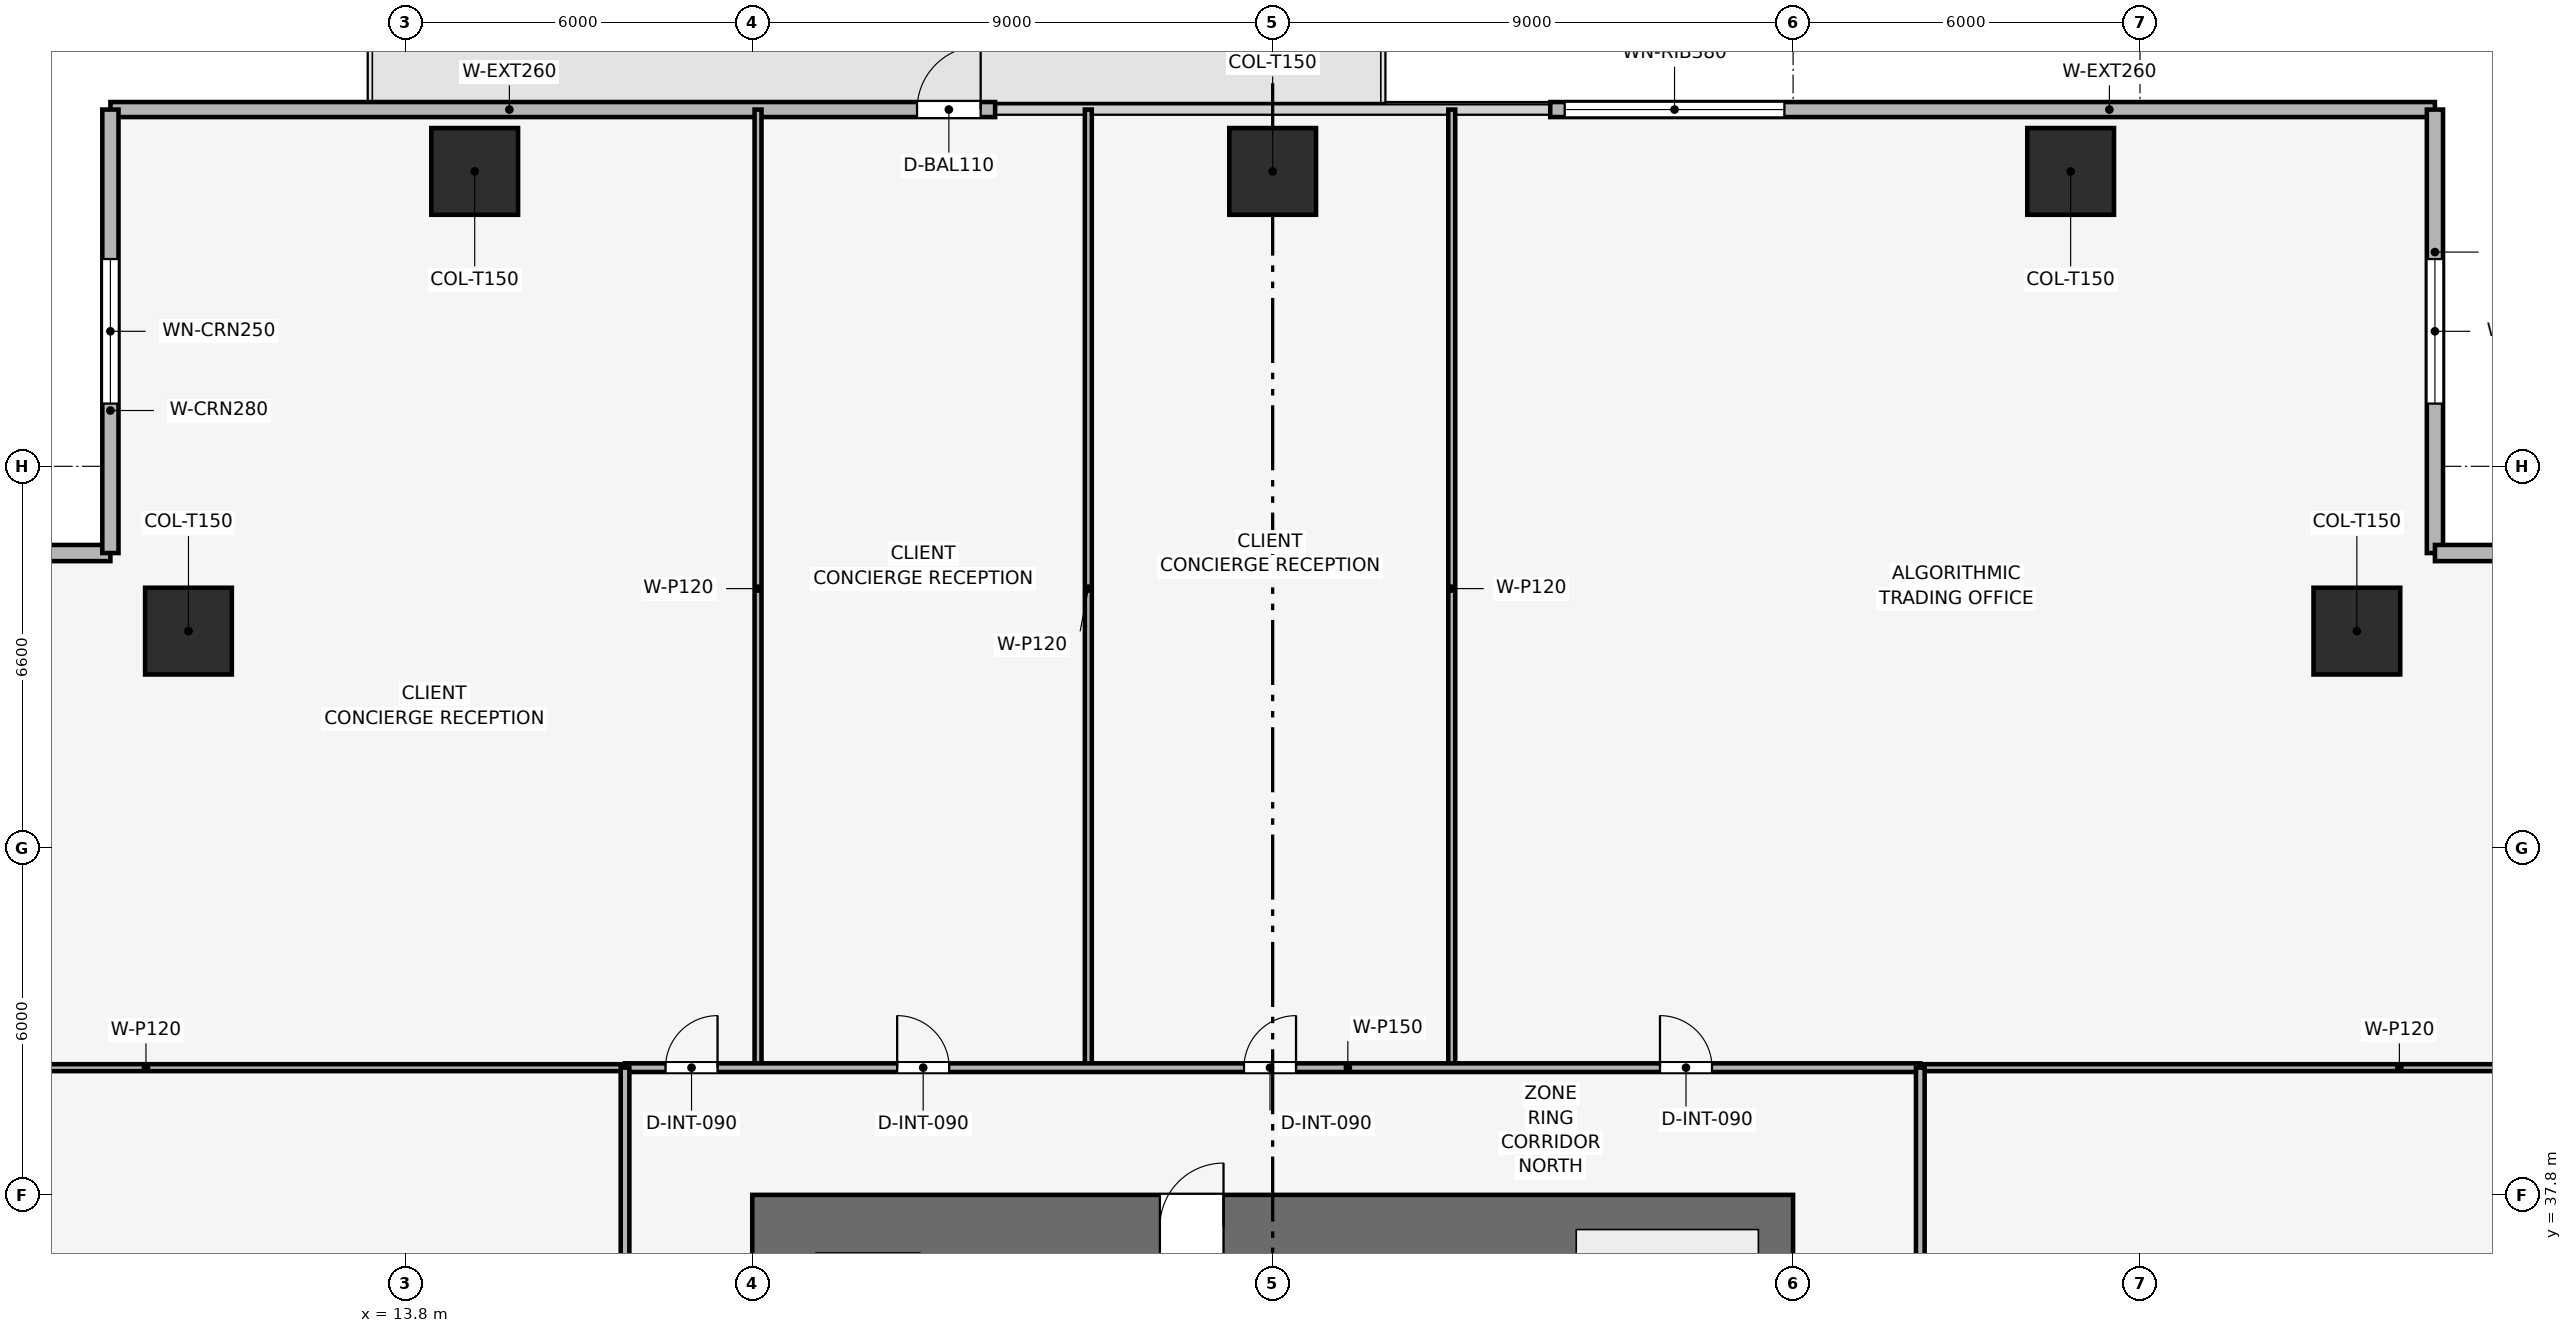
"""IFC4 building model, lengths in metres.
Left out: names, types, materials, properties, quantities, classifications, styles, units other than length and angle.
Written with IfcOpenShell. Run it as: python <this file> out.ifc"""

import sys

from ifc_helpers import new_model, si_unit, direction, frame, frame_2d, origin, origin_2d, place, context, subcontext, project, spatial, rectangle, extrude, element, fill, save


model = new_model("IFC4")
c1 = context("Model", 3, precision=1e-05, world=origin(), true_north=direction((0.0, 1.0)))
c2 = subcontext(c1, "Body", "Model", "MODEL_VIEW")
j1 = project(units=[si_unit("LENGTHUNIT", "METRE"), si_unit("PLANEANGLEUNIT", "RADIAN")], contexts=[c1])
p1 = place(None, origin())
s1 = spatial("IfcSite", under=j1, at=p1, CompositionType="ELEMENT")
p2 = place(p1, origin())
s2 = spatial("IfcBuilding", under=s1, at=p2, CompositionType="ELEMENT")
p3 = place(p2, frame((0.0, 0.0, 72.9)))
s3 = spatial("IfcBuildingStorey", under=s2, at=p3, CompositionType="ELEMENT", Elevation=72.9)
p4 = place(p3, frame((19.8, 37.25, 0.0), z_axis=(0.0, 0.0, 1.0), x_axis=(1.0, 0.0, 0.0)))
e1 = element("IfcWall", 1, at=p4, inside=s3, PredefinedType="SHEAR", context=c2, shape_type="SweptSolid", body=[
    extrude(rectangle(XDim=18.0, YDim=1.1, at=frame_2d((9.0, 0.0))), origin(), (0.0, 0.0, 1.0), 3.9),
])
p5 = place(p4, frame((7.05, 0.0, 0.0)))
e2 = element("IfcOpeningElement", 2, at=p5, cuts=e1, PredefinedType="OPENING", context=c2, shape_type="SweptSolid", body=[
    extrude(rectangle(XDim=1.1, YDim=2.15, at=frame_2d((0.55, 1.075))), frame((0.0, 0.56, 0.0), z_axis=(0.0, -1.0, 0.0), x_axis=(1.0, 0.0, 0.0)), (0.0, 0.0, 1.0), 1.12),
])
for number, where, z_axis, x_axis in (
    (3, (42.6, 55.5, 0.003), (0.0, 0.0, 1.0), (1.0, 0.0, 0.0)),
    (4, (28.8, 55.5, 0.003), (0.0, 0.0, 1.0), (1.0, 0.0, 0.0)),
    (5, (15.0, 55.5, 0.003), (0.0, 0.0, 1.0), (1.0, 0.0, 0.0)),
    (6, (47.55, 47.55, 0.003), (0.0, 0.0, 1.0), (1.0, 0.0, 0.0)),
    (7, (10.05, 47.55, 0.003), (0.0, 0.0, 1.0), (1.0, 0.0, 0.0)),
):
    element("IfcColumn", number, at=place(p3, frame(where, z_axis=z_axis, x_axis=x_axis)), inside=s3, PredefinedType="COLUMN", context=c2, shape_type="SweptSolid", body=[
        extrude(rectangle(XDim=1.5, YDim=1.5, at=origin_2d()), origin(), (0.0, 0.0, 1.0), 3.644),
    ])
p6 = place(p3, frame((8.7, 56.57, 0.0), z_axis=(0.0, 0.0, 1.0), x_axis=(1.0, 0.0, 0.0)))
e8 = element("IfcWall", 8, at=p6, inside=s3, PredefinedType="SOLIDWALL", context=c2, shape_type="SweptSolid", body=[
    extrude(rectangle(XDim=15.3, YDim=0.26, at=frame_2d((7.65, 0.0))), origin(), (0.0, 0.0, 1.0), 3.65),
])
p7 = place(p6, frame((13.95, 0.0, 0.0)))
e9 = element("IfcOpeningElement", 9, at=p7, cuts=e8, PredefinedType="OPENING", context=c2, shape_type="SweptSolid", body=[
    extrude(rectangle(XDim=1.1, YDim=2.2, at=frame_2d((0.55, 1.1))), frame((0.0, 0.14, 0.0), z_axis=(0.0, -1.0, 0.0), x_axis=(1.0, 0.0, 0.0)), (0.0, 0.0, 1.0), 0.28),
])
p8 = place(p3, frame((33.6, 56.57, 0.0), z_axis=(0.0, 0.0, 1.0), x_axis=(1.0, 0.0, 0.0)))
e10 = element("IfcWall", 10, at=p8, inside=s3, PredefinedType="SOLIDWALL", context=c2, shape_type="SweptSolid", body=[
    extrude(rectangle(XDim=15.3, YDim=0.26, at=frame_2d((7.65, 0.0))), origin(), (0.0, 0.0, 1.0), 3.65),
])
p9 = place(p8, frame((0.25, 0.0, 0.9)))
e11 = element("IfcOpeningElement", 11, at=p9, cuts=e10, PredefinedType="OPENING", context=c2, shape_type="SweptSolid", body=[
    extrude(rectangle(XDim=3.8, YDim=1.9, at=frame_2d((1.9, 0.95))), frame((0.0, 0.14, 0.0), z_axis=(0.0, -1.0, 0.0), x_axis=(1.0, 0.0, 0.0)), (0.0, 0.0, 1.0), 0.28),
])
p10 = place(p3, frame((1.03, 48.9, 0.0), z_axis=(0.0, 0.0, 1.0), x_axis=(1.0, 0.0, 0.0)))
e12 = element("IfcWall", 12, at=p10, inside=s3, PredefinedType="SOLIDWALL", context=c2, shape_type="SweptSolid", body=[
    extrude(rectangle(XDim=7.67, YDim=0.28, at=frame_2d((3.835, 0.0))), origin(), (0.0, 0.0, 1.0), 3.65),
])
p11 = place(p10, frame((2.585, 0.0, 0.9)))
e13 = element("IfcOpeningElement", 13, at=p11, cuts=e12, PredefinedType="OPENING", context=c2, shape_type="SweptSolid", body=[
    extrude(rectangle(XDim=2.5, YDim=1.9, at=frame_2d((1.25, 0.95))), frame((0.0, 0.15, 0.0), z_axis=(0.0, -1.0, 0.0), x_axis=(1.0, 0.0, 0.0)), (0.0, 0.0, 1.0), 0.3),
])
p12 = place(p3, frame((8.7, 48.9, 0.0), z_axis=(0.0, 0.0, 1.0), x_axis=(0.0, 1.0, 0.0)))
e14 = element("IfcWall", 14, at=p12, inside=s3, PredefinedType="SOLIDWALL", context=c2, shape_type="SweptSolid", body=[
    extrude(rectangle(XDim=7.67, YDim=0.28, at=frame_2d((3.835, 0.0))), origin(), (0.0, 0.0, 1.0), 3.65),
])
p13 = place(p12, frame((2.585, 0.0, 0.9)))
e15 = element("IfcOpeningElement", 15, at=p13, cuts=e14, PredefinedType="OPENING", context=c2, shape_type="SweptSolid", body=[
    extrude(rectangle(XDim=2.5, YDim=1.9, at=frame_2d((1.25, 0.95))), frame((0.0, 0.15, 0.0), z_axis=(0.0, -1.0, 0.0), x_axis=(1.0, 0.0, 0.0)), (0.0, 0.0, 1.0), 0.3),
])
p14 = place(p3, frame((48.9, 56.57, 0.0), z_axis=(0.0, 0.0, 1.0), x_axis=(0.0, -1.0, 0.0)))
e16 = element("IfcWall", 16, at=p14, inside=s3, PredefinedType="SOLIDWALL", context=c2, shape_type="SweptSolid", body=[
    extrude(rectangle(XDim=7.67, YDim=0.28, at=frame_2d((3.835, 0.0))), origin(), (0.0, 0.0, 1.0), 3.65),
])
p15 = place(p14, frame((2.585, 0.0, 0.9)))
e17 = element("IfcOpeningElement", 17, at=p15, cuts=e16, PredefinedType="OPENING", context=c2, shape_type="SweptSolid", body=[
    extrude(rectangle(XDim=2.5, YDim=1.9, at=frame_2d((1.25, 0.95))), frame((0.0, 0.15, 0.0), z_axis=(0.0, -1.0, 0.0), x_axis=(1.0, 0.0, 0.0)), (0.0, 0.0, 1.0), 0.3),
])
p16 = place(p3, frame((48.9, 48.9, 0.0), z_axis=(0.0, 0.0, 1.0), x_axis=(1.0, 0.0, 0.0)))
e18 = element("IfcWall", 18, at=p16, inside=s3, PredefinedType="SOLIDWALL", context=c2, shape_type="SweptSolid", body=[
    extrude(rectangle(XDim=7.67, YDim=0.28, at=frame_2d((3.835, 0.0))), origin(), (0.0, 0.0, 1.0), 3.65),
])
p17 = place(p16, frame((2.585, 0.0, 0.9)))
e19 = element("IfcOpeningElement", 19, at=p17, cuts=e18, PredefinedType="OPENING", context=c2, shape_type="SweptSolid", body=[
    extrude(rectangle(XDim=2.5, YDim=1.9, at=frame_2d((1.25, 0.95))), frame((0.0, 0.15, 0.0), z_axis=(0.0, -1.0, 0.0), x_axis=(1.0, 0.0, 0.0)), (0.0, 0.0, 1.0), 0.3),
])
for number, where, z_axis, x_axis in (
    (20, (19.9, 40.0, 0.0), (0.0, 0.0, 1.0), (0.0, 1.0, 0.0)),
    (21, (25.612, 40.0, 0.0), (0.0, 0.0, 1.0), (0.0, 1.0, 0.0)),
    (22, (31.897, 40.0, 0.0), (0.0, 0.0, 1.0), (0.0, 1.0, 0.0)),
    (23, (1.03, 40.0, 0.0), (0.0, 0.0, 1.0), (1.0, 0.0, 0.0)),
    (24, (40.0, 40.0, 0.0), (0.0, 0.0, 1.0), (1.0, 0.0, 0.0)),
):
    element("IfcWall", number, at=place(p3, frame(where, z_axis=z_axis, x_axis=x_axis)), inside=s3, PredefinedType="PARTITIONING", context=c2, shape_type="SweptSolid", body=[
        extrude(rectangle(XDim=16.57, YDim=0.12, at=frame_2d((8.285, 0.0))), origin(), (0.0, 0.0, 1.0), 2.935),
    ])
p18 = place(p3, frame((17.6, 40.0, 0.0), z_axis=(0.0, 0.0, 1.0), x_axis=(1.0, 0.0, 0.0)))
e25 = element("IfcWall", 25, at=p18, inside=s3, PredefinedType="PARTITIONING", context=c2, shape_type="SweptSolid", body=[
    extrude(rectangle(XDim=22.4, YDim=0.15, at=frame_2d((11.2, 0.0))), origin(), (0.0, 0.0, 1.0), 3.085),
])
p19 = place(p18, frame((0.7, 0.0, 0.0)))
e26 = element("IfcOpeningElement", 26, at=p19, cuts=e25, PredefinedType="OPENING", context=c2, shape_type="SweptSolid", body=[
    extrude(rectangle(XDim=0.9, YDim=2.1, at=frame_2d((0.45, 1.05))), frame((0.0, 0.085, 0.0), z_axis=(0.0, -1.0, 0.0), x_axis=(1.0, 0.0, 0.0)), (0.0, 0.0, 1.0), 0.17),
])
p20 = place(p18, frame((4.706, 0.0, 0.0)))
e27 = element("IfcOpeningElement", 27, at=p20, cuts=e25, PredefinedType="OPENING", context=c2, shape_type="SweptSolid", body=[
    extrude(rectangle(XDim=0.9, YDim=2.1, at=frame_2d((0.45, 1.05))), frame((0.0, 0.085, 0.0), z_axis=(0.0, -1.0, 0.0), x_axis=(1.0, 0.0, 0.0)), (0.0, 0.0, 1.0), 0.17),
])
p21 = place(p18, frame((10.704, 0.0, 0.0)))
e28 = element("IfcOpeningElement", 28, at=p21, cuts=e25, PredefinedType="OPENING", context=c2, shape_type="SweptSolid", body=[
    extrude(rectangle(XDim=0.9, YDim=2.1, at=frame_2d((0.45, 1.05))), frame((0.0, 0.085, 0.0), z_axis=(0.0, -1.0, 0.0), x_axis=(1.0, 0.0, 0.0)), (0.0, 0.0, 1.0), 0.17),
])
p22 = place(p18, frame((17.898, 0.0, 0.0)))
e29 = element("IfcOpeningElement", 29, at=p22, cuts=e25, PredefinedType="OPENING", context=c2, shape_type="SweptSolid", body=[
    extrude(rectangle(XDim=0.9, YDim=2.1, at=frame_2d((0.45, 1.05))), frame((0.0, 0.085, 0.0), z_axis=(0.0, -1.0, 0.0), x_axis=(1.0, 0.0, 0.0)), (0.0, 0.0, 1.0), 0.17),
])
p23 = place(p3, frame((17.6, 17.6, 0.0), z_axis=(0.0, 0.0, 1.0), x_axis=(0.0, 1.0, 0.0)))
e30 = element("IfcWall", 30, at=p23, inside=s3, PredefinedType="PARTITIONING", context=c2, shape_type="SweptSolid", body=[
    extrude(rectangle(XDim=22.4, YDim=0.15, at=frame_2d((11.2, 0.0))), origin(), (0.0, 0.0, 1.0), 3.085),
])
p24 = place(p23, frame((0.778, 0.0, 0.0)))
e31 = element("IfcOpeningElement", 31, at=p24, cuts=e30, PredefinedType="OPENING", context=c2, shape_type="SweptSolid", body=[
    extrude(rectangle(XDim=0.9, YDim=2.1, at=frame_2d((0.45, 1.05))), frame((0.0, 0.085, 0.0), z_axis=(0.0, -1.0, 0.0), x_axis=(1.0, 0.0, 0.0)), (0.0, 0.0, 1.0), 0.17),
])
p25 = place(p23, frame((6.372, 0.0, 0.0)))
e32 = element("IfcOpeningElement", 32, at=p25, cuts=e30, PredefinedType="OPENING", context=c2, shape_type="SweptSolid", body=[
    extrude(rectangle(XDim=0.9, YDim=2.1, at=frame_2d((0.45, 1.05))), frame((0.0, 0.085, 0.0), z_axis=(0.0, -1.0, 0.0), x_axis=(1.0, 0.0, 0.0)), (0.0, 0.0, 1.0), 0.17),
])
p26 = place(p23, frame((16.343, 0.0, 0.0)))
e33 = element("IfcOpeningElement", 33, at=p26, cuts=e30, PredefinedType="OPENING", context=c2, shape_type="SweptSolid", body=[
    extrude(rectangle(XDim=0.9, YDim=2.1, at=frame_2d((0.45, 1.05))), frame((0.0, 0.085, 0.0), z_axis=(0.0, -1.0, 0.0), x_axis=(1.0, 0.0, 0.0)), (0.0, 0.0, 1.0), 0.17),
])
p27 = place(p3, frame((40.0, 17.6, 0.0), z_axis=(0.0, 0.0, 1.0), x_axis=(0.0, 1.0, 0.0)))
e34 = element("IfcWall", 34, at=p27, inside=s3, PredefinedType="PARTITIONING", context=c2, shape_type="SweptSolid", body=[
    extrude(rectangle(XDim=22.4, YDim=0.15, at=frame_2d((11.2, 0.0))), origin(), (0.0, 0.0, 1.0), 3.085),
])
p28 = place(p27, frame((1.4, 0.0, 0.0)))
e35 = element("IfcOpeningElement", 35, at=p28, cuts=e34, PredefinedType="OPENING", context=c2, shape_type="SweptSolid", body=[
    extrude(rectangle(XDim=0.9, YDim=2.1, at=frame_2d((0.45, 1.05))), frame((0.0, 0.085, 0.0), z_axis=(0.0, -1.0, 0.0), x_axis=(1.0, 0.0, 0.0)), (0.0, 0.0, 1.0), 0.17),
])
p29 = place(p27, frame((4.65, 0.0, 0.0)))
e36 = element("IfcOpeningElement", 36, at=p29, cuts=e34, PredefinedType="OPENING", context=c2, shape_type="SweptSolid", body=[
    extrude(rectangle(XDim=0.9, YDim=2.1, at=frame_2d((0.45, 1.05))), frame((0.0, 0.085, 0.0), z_axis=(0.0, -1.0, 0.0), x_axis=(1.0, 0.0, 0.0)), (0.0, 0.0, 1.0), 0.17),
])
p30 = place(p27, frame((7.55, 0.0, 0.0)))
e37 = element("IfcOpeningElement", 37, at=p30, cuts=e34, PredefinedType="OPENING", context=c2, shape_type="SweptSolid", body=[
    extrude(rectangle(XDim=0.9, YDim=2.1, at=frame_2d((0.45, 1.05))), frame((0.0, 0.085, 0.0), z_axis=(0.0, -1.0, 0.0), x_axis=(1.0, 0.0, 0.0)), (0.0, 0.0, 1.0), 0.17),
])
p31 = place(p27, frame((10.3, 0.0, 0.0)))
e38 = element("IfcOpeningElement", 38, at=p31, cuts=e34, PredefinedType="OPENING", context=c2, shape_type="SweptSolid", body=[
    extrude(rectangle(XDim=0.95, YDim=2.1, at=frame_2d((0.475, 1.05))), frame((0.0, 0.085, 0.0), z_axis=(0.0, -1.0, 0.0), x_axis=(1.0, 0.0, 0.0)), (0.0, 0.0, 1.0), 0.17),
])
p32 = place(p27, frame((16.8, 0.0, 0.0)))
e39 = element("IfcOpeningElement", 39, at=p32, cuts=e34, PredefinedType="OPENING", context=c2, shape_type="SweptSolid", body=[
    extrude(rectangle(XDim=0.9, YDim=2.1, at=frame_2d((0.45, 1.05))), frame((0.0, 0.085, 0.0), z_axis=(0.0, -1.0, 0.0), x_axis=(1.0, 0.0, 0.0)), (0.0, 0.0, 1.0), 0.17),
])
p33 = place(p7, origin())
e40 = element("IfcDoor", 40, at=p33, inside=s3, OperationType="SINGLE_SWING_RIGHT", PredefinedType="DOOR", context=c2, shape_type="SweptSolid", body=[
    extrude(rectangle(XDim=1.1, YDim=2.2, at=frame_2d((0.55, 1.1))), frame((0.0, 0.025, 0.0), z_axis=(0.0, -1.0, 0.0), x_axis=(1.0, 0.0, 0.0)), (0.0, 0.0, 1.0), 0.05),
])
fill(e9, e40)
p34 = place(p9, origin())
e41 = element("IfcWindow", 41, at=p34, inside=s3, PartitioningType="SINGLE_PANEL", PredefinedType="WINDOW", context=c2, shape_type="SweptSolid", body=[
    extrude(rectangle(XDim=3.8, YDim=1.9, at=frame_2d((1.9, 0.95))), frame((0.0, 0.03, 0.0), z_axis=(0.0, -1.0, 0.0), x_axis=(1.0, 0.0, 0.0)), (0.0, 0.0, 1.0), 0.06),
])
fill(e11, e41)
p35 = place(p13, origin())
e42 = element("IfcWindow", 42, at=p35, inside=s3, PartitioningType="SINGLE_PANEL", PredefinedType="WINDOW", context=c2, shape_type="SweptSolid", body=[
    extrude(rectangle(XDim=2.5, YDim=1.9, at=frame_2d((1.25, 0.95))), frame((0.0, 0.03, 0.0), z_axis=(0.0, -1.0, 0.0), x_axis=(1.0, 0.0, 0.0)), (0.0, 0.0, 1.0), 0.06),
])
fill(e15, e42)
p36 = place(p15, origin())
e43 = element("IfcWindow", 43, at=p36, inside=s3, PartitioningType="SINGLE_PANEL", PredefinedType="WINDOW", context=c2, shape_type="SweptSolid", body=[
    extrude(rectangle(XDim=2.5, YDim=1.9, at=frame_2d((1.25, 0.95))), frame((0.0, 0.03, 0.0), z_axis=(0.0, -1.0, 0.0), x_axis=(1.0, 0.0, 0.0)), (0.0, 0.0, 1.0), 0.06),
])
fill(e17, e43)
p37 = place(p19, origin())
e44 = element("IfcDoor", 44, at=p37, inside=s3, OperationType="SINGLE_SWING_RIGHT", PredefinedType="DOOR", context=c2, shape_type="SweptSolid", body=[
    extrude(rectangle(XDim=0.9, YDim=2.1, at=frame_2d((0.45, 1.05))), frame((0.0, 0.025, 0.0), z_axis=(0.0, -1.0, 0.0), x_axis=(1.0, 0.0, 0.0)), (0.0, 0.0, 1.0), 0.05),
])
fill(e26, e44)
p38 = place(p20, origin())
e45 = element("IfcDoor", 45, at=p38, inside=s3, OperationType="SINGLE_SWING_LEFT", PredefinedType="DOOR", context=c2, shape_type="SweptSolid", body=[
    extrude(rectangle(XDim=0.9, YDim=2.1, at=frame_2d((0.45, 1.05))), frame((0.0, 0.025, 0.0), z_axis=(0.0, -1.0, 0.0), x_axis=(1.0, 0.0, 0.0)), (0.0, 0.0, 1.0), 0.05),
])
fill(e27, e45)
p39 = place(p21, origin())
e46 = element("IfcDoor", 46, at=p39, inside=s3, OperationType="SINGLE_SWING_RIGHT", PredefinedType="DOOR", context=c2, shape_type="SweptSolid", body=[
    extrude(rectangle(XDim=0.9, YDim=2.1, at=frame_2d((0.45, 1.05))), frame((0.0, 0.025, 0.0), z_axis=(0.0, -1.0, 0.0), x_axis=(1.0, 0.0, 0.0)), (0.0, 0.0, 1.0), 0.05),
])
fill(e28, e46)
p40 = place(p22, origin())
e47 = element("IfcDoor", 47, at=p40, inside=s3, OperationType="SINGLE_SWING_LEFT", PredefinedType="DOOR", context=c2, shape_type="SweptSolid", body=[
    extrude(rectangle(XDim=0.9, YDim=2.1, at=frame_2d((0.45, 1.05))), frame((0.0, 0.025, 0.0), z_axis=(0.0, -1.0, 0.0), x_axis=(1.0, 0.0, 0.0)), (0.0, 0.0, 1.0), 0.05),
])
fill(e29, e47)
p41 = place(p5, origin())
e48 = element("IfcDoor", 48, at=p41, inside=s3, OperationType="SINGLE_SWING_RIGHT", PredefinedType="DOOR", context=c2, shape_type="SweptSolid", body=[
    extrude(rectangle(XDim=1.1, YDim=2.15, at=frame_2d((0.55, 1.075))), frame((0.0, 0.025, 0.0), z_axis=(0.0, -1.0, 0.0), x_axis=(1.0, 0.0, 0.0)), (0.0, 0.0, 1.0), 0.05),
])
fill(e2, e48)
save(model, sys.argv[1])
